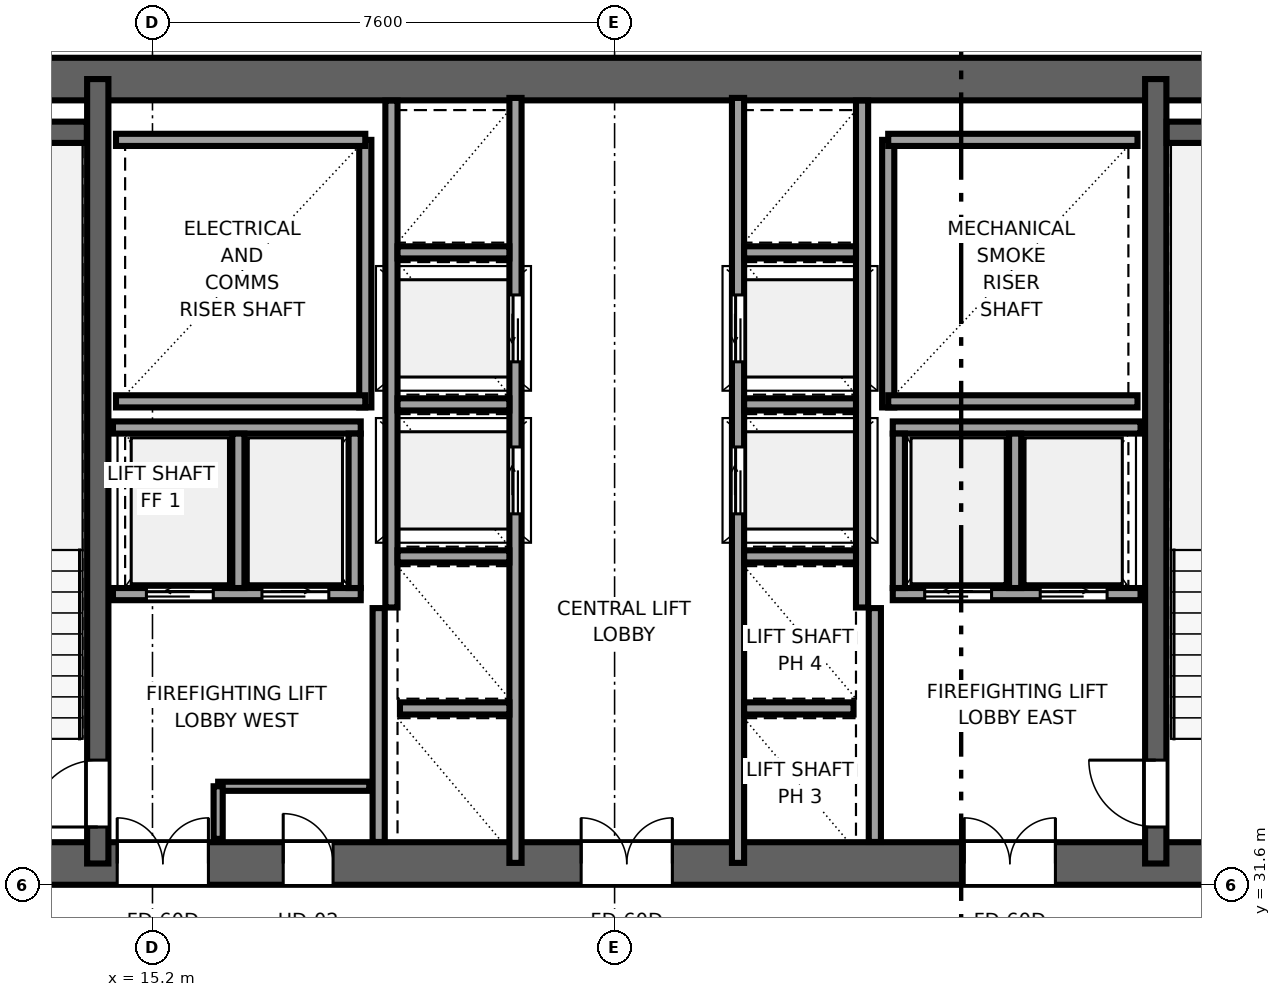
"""IFC4 building model, lengths in metres.
Left out: names, types, materials, properties, quantities, classifications, styles, units other than length and angle.
Written with IfcOpenShell. Run it as: python <this file> out.ifc"""

import sys

from ifc_helpers import new_model, si_unit, direction, frame, frame_2d, origin, place, context, subcontext, project, spatial, rectangle, extrude, source, transform, mapped, element, fill, save


model = new_model("IFC4")
c1 = context("Model", 3, precision=1e-05, world=origin(), true_north=direction((0.0, 1.0)))
c2 = subcontext(c1, "Body", "Model", "MODEL_VIEW")
j1 = project(units=[si_unit("LENGTHUNIT", "METRE"), si_unit("PLANEANGLEUNIT", "RADIAN")], contexts=[c1])
p1 = place(None, origin())
s1 = spatial("IfcSite", under=j1, at=p1, CompositionType="ELEMENT")
p2 = place(p1, origin())
s2 = spatial("IfcBuilding", under=s1, at=p2, CompositionType="ELEMENT")
p3 = place(p2, frame((0.0, 0.0, 164.8)))
s3 = spatial("IfcBuildingStorey", under=s2, at=p3, CompositionType="ELEMENT", Elevation=164.8)
p4 = place(p3, frame((9.8, 31.95, 0.0), z_axis=(0.0, 0.0, 1.0), x_axis=(1.0, 0.0, 0.0)))
e1 = element("IfcWall", 1, at=p4, inside=s3, PredefinedType="SHEAR", context=c2, shape_type="SweptSolid", body=[
    extrude(rectangle(XDim=26.4, YDim=0.7, at=frame_2d((13.2, 0.0))), origin(), (0.0, 0.0, 1.0), 3.55),
])
p5 = place(p4, frame((6.32, 0.0, 0.0), z_axis=(0.0, 0.0, 1.0), x_axis=(-1.0, 0.0, 0.0)))
e2 = element("IfcOpeningElement", 2, at=p5, cuts=e1, PredefinedType="OPENING", context=c2, shape_type="SweptSolid", body=[
    extrude(rectangle(XDim=1.5, YDim=2.04, at=frame_2d((0.75, 1.02))), frame((0.0, 0.36, 0.0), z_axis=(0.0, -1.0, 0.0), x_axis=(1.0, 0.0, 0.0)), (0.0, 0.0, 1.0), 0.72),
])
p6 = place(p4, frame((13.95, 0.0, 0.0), z_axis=(0.0, 0.0, 1.0), x_axis=(-1.0, 0.0, 0.0)))
e3 = element("IfcOpeningElement", 3, at=p6, cuts=e1, PredefinedType="OPENING", context=c2, shape_type="SweptSolid", body=[
    extrude(rectangle(XDim=1.5, YDim=2.04, at=frame_2d((0.75, 1.02))), frame((0.0, 0.36, 0.0), z_axis=(0.0, -1.0, 0.0), x_axis=(1.0, 0.0, 0.0)), (0.0, 0.0, 1.0), 0.72),
])
p7 = place(p4, frame((20.25, 0.0, 0.0), z_axis=(0.0, 0.0, 1.0), x_axis=(-1.0, 0.0, 0.0)))
e4 = element("IfcOpeningElement", 4, at=p7, cuts=e1, PredefinedType="OPENING", context=c2, shape_type="SweptSolid", body=[
    extrude(rectangle(XDim=1.5, YDim=2.04, at=frame_2d((0.75, 1.02))), frame((0.0, 0.36, 0.0), z_axis=(0.0, -1.0, 0.0), x_axis=(1.0, 0.0, 0.0)), (0.0, 0.0, 1.0), 0.72),
])
p8 = place(p4, frame((8.37, 0.0, 0.0), z_axis=(0.0, 0.0, 1.0), x_axis=(-1.0, 0.0, 0.0)))
e5 = element("IfcOpeningElement", 5, at=p8, cuts=e1, PredefinedType="OPENING", context=c2, shape_type="SweptSolid", body=[
    extrude(rectangle(XDim=0.82, YDim=2.01, at=frame_2d((0.41, 1.005))), frame((0.0, 0.36, 0.0), z_axis=(0.0, -1.0, 0.0), x_axis=(1.0, 0.0, 0.0)), (0.0, 0.0, 1.0), 0.72),
])
p9 = place(p3, frame((9.8, 44.85, 0.0), z_axis=(0.0, 0.0, 1.0), x_axis=(1.0, 0.0, 0.0)))
e6 = element("IfcWall", 6, at=p9, inside=s3, PredefinedType="SHEAR", context=c2, shape_type="SweptSolid", body=[
    extrude(rectangle(XDim=26.4, YDim=0.7, at=frame_2d((13.2, 0.0))), origin(), (0.0, 0.0, 1.0), 3.55),
])
p10 = place(p3, frame((14.3, 31.95, 0.0), z_axis=(0.0, 0.0, 1.0), x_axis=(0.0, 1.0, 0.0)))
e7 = element("IfcWall", 7, at=p10, inside=s3, PredefinedType="SHEAR", context=c2, shape_type="SweptSolid", body=[
    extrude(rectangle(XDim=12.9, YDim=0.35, at=frame_2d((6.45, 0.0))), origin(), (0.0, 0.0, 1.0), 3.55),
])
p11 = place(p10, frame((0.6, 0.0, 0.0)))
e8 = element("IfcOpeningElement", 8, at=p11, cuts=e7, PredefinedType="OPENING", context=c2, shape_type="SweptSolid", body=[
    extrude(rectangle(XDim=1.1, YDim=2.12, at=frame_2d((0.55, 1.06))), frame((0.0, 0.185, 0.0), z_axis=(0.0, -1.0, 0.0), x_axis=(1.0, 0.0, 0.0)), (0.0, 0.0, 1.0), 0.37),
])
p12 = place(p3, frame((31.7, 31.95, 0.0), z_axis=(0.0, 0.0, 1.0), x_axis=(0.0, 1.0, 0.0)))
e9 = element("IfcWall", 9, at=p12, inside=s3, PredefinedType="SHEAR", context=c2, shape_type="SweptSolid", body=[
    extrude(rectangle(XDim=12.9, YDim=0.35, at=frame_2d((6.45, 0.0))), origin(), (0.0, 0.0, 1.0), 3.55),
])
p13 = place(p12, frame((1.7, 0.0, 0.0), z_axis=(0.0, 0.0, 1.0), x_axis=(-1.0, 0.0, 0.0)))
e10 = element("IfcOpeningElement", 10, at=p13, cuts=e9, PredefinedType="OPENING", context=c2, shape_type="SweptSolid", body=[
    extrude(rectangle(XDim=1.1, YDim=2.12, at=frame_2d((0.55, 1.06))), frame((0.0, 0.185, 0.0), z_axis=(0.0, -1.0, 0.0), x_axis=(1.0, 0.0, 0.0)), (0.0, 0.0, 1.0), 0.37),
])
for number, where, z_axis, x_axis in (
    (11, (10.52, 43.975, 0.0), (0.0, 0.0, 1.0), (1.0, 0.0, 0.0)),
    (12, (31.88, 43.975, 0.0), (0.0, 0.0, 1.0), (1.0, 0.0, 0.0)),
):
    element("IfcWall", number, at=place(p3, frame(where, z_axis=z_axis, x_axis=x_axis)), inside=s3, PredefinedType="SHEAR", context=c2, shape_type="SweptSolid", body=[
        extrude(rectangle(XDim=3.6, YDim=0.35, at=frame_2d((1.8, 0.0))), origin(), (0.0, 0.0, 1.0), 3.55),
    ])
p14 = place(p3, frame((18.7, 39.45, 0.0), z_axis=(0.0, 0.0, 1.0), x_axis=(0.0, 1.0, 0.0)))
e13 = element("IfcWall", 13, at=p14, inside=s3, PredefinedType="SOLIDWALL", context=c2, shape_type="SweptSolid", body=[
    extrude(rectangle(XDim=4.4, YDim=0.2, at=frame_2d((2.2, 0.0))), origin(), (0.0, 0.0, 1.0), 3.37),
])
for number, where, z_axis, x_axis in (
    (14, (14.6, 39.55, 0.0), (0.0, 0.0, 1.0), (1.0, 0.0, 0.0)),
    (15, (14.6, 43.85, 0.0), (0.0, 0.0, 1.0), (1.0, 0.0, 0.0)),
):
    element("IfcWall", number, at=place(p3, frame(where, z_axis=z_axis, x_axis=x_axis)), inside=s3, PredefinedType="SOLIDWALL", context=c2, shape_type="SweptSolid", body=[
        extrude(rectangle(XDim=4.1, YDim=0.2, at=frame_2d((2.05, 0.0))), origin(), (0.0, 0.0, 1.0), 3.37),
    ])
p15 = place(p3, frame((27.3, 39.45, 0.0), z_axis=(0.0, 0.0, 1.0), x_axis=(0.0, 1.0, 0.0)))
e16 = element("IfcWall", 16, at=p15, inside=s3, PredefinedType="SOLIDWALL", context=c2, shape_type="SweptSolid", body=[
    extrude(rectangle(XDim=4.4, YDim=0.2, at=frame_2d((2.2, 0.0))), origin(), (0.0, 0.0, 1.0), 3.37),
])
for number, where, z_axis, x_axis in (
    (17, (27.3, 39.55, 0.0), (0.0, 0.0, 1.0), (1.0, 0.0, 0.0)),
    (18, (27.3, 43.85, 0.0), (0.0, 0.0, 1.0), (1.0, 0.0, 0.0)),
):
    element("IfcWall", number, at=place(p3, frame(where, z_axis=z_axis, x_axis=x_axis)), inside=s3, PredefinedType="SOLIDWALL", context=c2, shape_type="SweptSolid", body=[
        extrude(rectangle(XDim=4.1, YDim=0.2, at=frame_2d((2.05, 0.0))), origin(), (0.0, 0.0, 1.0), 3.37),
    ])
for number, where, z_axis, x_axis in (
    (19, (18.92, 32.304, 0.0), (0.0, 0.0, 1.0), (0.0, 1.0, 0.0)),
    (20, (27.08, 32.304, 0.0), (0.0, 0.0, 1.0), (0.0, 1.0, 0.0)),
):
    element("IfcWall", number, at=place(p3, frame(where, z_axis=z_axis, x_axis=x_axis)), inside=s3, PredefinedType="SOLIDWALL", context=c2, shape_type="SweptSolid", body=[
        extrude(rectangle(XDim=3.846, YDim=0.2, at=frame_2d((1.923, 0.0))), origin(), (0.0, 0.0, 1.0), 3.37),
    ])
p16 = place(p3, frame((21.17, 31.96, 0.0), z_axis=(0.0, 0.0, 1.0), x_axis=(0.0, 1.0, 0.0)))
e21 = element("IfcWall", 21, at=p16, inside=s3, PredefinedType="SOLIDWALL", context=c2, shape_type="SweptSolid", body=[
    extrude(rectangle(XDim=12.58, YDim=0.2, at=frame_2d((6.29, 0.0))), origin(), (0.0, 0.0, 1.0), 3.37),
])
p17 = place(p16, frame((5.74, 0.0, 0.0)))
e22 = element("IfcOpeningElement", 22, at=p17, cuts=e21, PredefinedType="OPENING", context=c2, shape_type="SweptSolid", body=[
    extrude(rectangle(XDim=1.1, YDim=2.12, at=frame_2d((0.55, 1.06))), frame((0.0, 0.11, 0.0), z_axis=(0.0, -1.0, 0.0), x_axis=(1.0, 0.0, 0.0)), (0.0, 0.0, 1.0), 0.22),
])
p18 = place(p16, frame((8.24, 0.0, 0.0)))
e23 = element("IfcOpeningElement", 23, at=p18, cuts=e21, PredefinedType="OPENING", context=c2, shape_type="SweptSolid", body=[
    extrude(rectangle(XDim=1.1, YDim=2.12, at=frame_2d((0.55, 1.06))), frame((0.0, 0.11, 0.0), z_axis=(0.0, -1.0, 0.0), x_axis=(1.0, 0.0, 0.0)), (0.0, 0.0, 1.0), 0.22),
])
p19 = place(p3, frame((19.13, 36.16, 0.0), z_axis=(0.0, 0.0, 1.0), x_axis=(0.0, 1.0, 0.0)))
e24 = element("IfcWall", 24, at=p19, inside=s3, PredefinedType="SOLIDWALL", context=c2, shape_type="SweptSolid", body=[
    extrude(rectangle(XDim=8.336, YDim=0.2, at=frame_2d((4.168, 0.0))), origin(), (0.0, 0.0, 1.0), 3.37),
])
p20 = place(p3, frame((19.27, 34.5, 0.0), z_axis=(0.0, 0.0, 1.0), x_axis=(1.0, 0.0, 0.0)))
e25 = element("IfcWall", 25, at=p20, inside=s3, PredefinedType="SOLIDWALL", context=c2, shape_type="SweptSolid", body=[
    extrude(rectangle(XDim=1.8, YDim=0.2, at=frame_2d((0.9, 0.0))), origin(), (0.0, 0.0, 1.0), 3.37),
])
for number, where, z_axis, x_axis in (
    (26, (19.23, 37.0, 0.0), (0.0, 0.0, 1.0), (1.0, 0.0, 0.0)),
    (27, (19.23, 39.5, 0.0), (0.0, 0.0, 1.0), (1.0, 0.0, 0.0)),
    (28, (19.23, 42.0, 0.0), (0.0, 0.0, 1.0), (1.0, 0.0, 0.0)),
):
    element("IfcWall", number, at=place(p3, frame(where, z_axis=z_axis, x_axis=x_axis)), inside=s3, PredefinedType="SOLIDWALL", context=c2, shape_type="SweptSolid", body=[
        extrude(rectangle(XDim=1.84, YDim=0.2, at=frame_2d((0.92, 0.0))), origin(), (0.0, 0.0, 1.0), 3.37),
    ])
p21 = place(p3, frame((27.375, 36.38, 0.0), z_axis=(0.0, 0.0, 1.0), x_axis=(1.0, 0.0, 0.0)))
e29 = element("IfcWall", 29, at=p21, inside=s3, PredefinedType="SOLIDWALL", context=c2, shape_type="SweptSolid", body=[
    extrude(rectangle(XDim=4.075, YDim=0.2, at=frame_2d((2.038, 0.0))), origin(), (0.0, 0.0, 1.0), 3.37),
])
p22 = place(p21, frame((0.525, 0.0, 0.0)))
e30 = element("IfcOpeningElement", 30, at=p22, cuts=e29, PredefinedType="OPENING", context=c2, shape_type="SweptSolid", body=[
    extrude(rectangle(XDim=1.1, YDim=2.12, at=frame_2d((0.55, 1.06))), frame((0.0, 0.11, 0.0), z_axis=(0.0, -1.0, 0.0), x_axis=(1.0, 0.0, 0.0)), (0.0, 0.0, 1.0), 0.22),
])
p23 = place(p21, frame((2.425, 0.0, 0.0)))
e31 = element("IfcOpeningElement", 31, at=p23, cuts=e29, PredefinedType="OPENING", context=c2, shape_type="SweptSolid", body=[
    extrude(rectangle(XDim=1.1, YDim=2.12, at=frame_2d((0.55, 1.06))), frame((0.0, 0.11, 0.0), z_axis=(0.0, -1.0, 0.0), x_axis=(1.0, 0.0, 0.0)), (0.0, 0.0, 1.0), 0.22),
])
p24 = place(p3, frame((27.375, 39.12, 0.0), z_axis=(0.0, 0.0, 1.0), x_axis=(1.0, 0.0, 0.0)))
e32 = element("IfcWall", 32, at=p24, inside=s3, PredefinedType="SOLIDWALL", context=c2, shape_type="SweptSolid", body=[
    extrude(rectangle(XDim=4.075, YDim=0.2, at=frame_2d((2.038, 0.0))), origin(), (0.0, 0.0, 1.0), 3.37),
])
for number, where, z_axis, x_axis in (
    (33, (27.475, 36.48, 0.0), (0.0, 0.0, 1.0), (0.0, 1.0, 0.0)),
    (34, (29.387, 36.48, 0.0), (0.0, 0.0, 1.0), (0.0, 1.0, 0.0)),
):
    element("IfcWall", number, at=place(p3, frame(where, z_axis=z_axis, x_axis=x_axis)), inside=s3, PredefinedType="SOLIDWALL", context=c2, shape_type="SweptSolid", body=[
        extrude(rectangle(XDim=2.54, YDim=0.2, at=frame_2d((1.27, 0.0))), origin(), (0.0, 0.0, 1.0), 3.37),
    ])
p25 = place(p3, frame((14.55, 36.38, 0.0), z_axis=(0.0, 0.0, 1.0), x_axis=(1.0, 0.0, 0.0)))
e35 = element("IfcWall", 35, at=p25, inside=s3, PredefinedType="SOLIDWALL", context=c2, shape_type="SweptSolid", body=[
    extrude(rectangle(XDim=4.075, YDim=0.2, at=frame_2d((2.038, 0.0))), origin(), (0.0, 0.0, 1.0), 3.37),
])
p26 = place(p25, frame((0.55, 0.0, 0.0)))
e36 = element("IfcOpeningElement", 36, at=p26, cuts=e35, PredefinedType="OPENING", context=c2, shape_type="SweptSolid", body=[
    extrude(rectangle(XDim=1.1, YDim=2.12, at=frame_2d((0.55, 1.06))), frame((0.0, 0.11, 0.0), z_axis=(0.0, -1.0, 0.0), x_axis=(1.0, 0.0, 0.0)), (0.0, 0.0, 1.0), 0.22),
])
p27 = place(p25, frame((2.45, 0.0, 0.0)))
e37 = element("IfcOpeningElement", 37, at=p27, cuts=e35, PredefinedType="OPENING", context=c2, shape_type="SweptSolid", body=[
    extrude(rectangle(XDim=1.1, YDim=2.12, at=frame_2d((0.55, 1.06))), frame((0.0, 0.11, 0.0), z_axis=(0.0, -1.0, 0.0), x_axis=(1.0, 0.0, 0.0)), (0.0, 0.0, 1.0), 0.22),
])
p28 = place(p3, frame((14.55, 39.12, 0.0), z_axis=(0.0, 0.0, 1.0), x_axis=(1.0, 0.0, 0.0)))
e38 = element("IfcWall", 38, at=p28, inside=s3, PredefinedType="SOLIDWALL", context=c2, shape_type="SweptSolid", body=[
    extrude(rectangle(XDim=4.075, YDim=0.2, at=frame_2d((2.038, 0.0))), origin(), (0.0, 0.0, 1.0), 3.37),
])
for number, where, z_axis, x_axis in (
    (39, (18.525, 36.48, 0.0), (0.0, 0.0, 1.0), (0.0, 1.0, 0.0)),
    (40, (16.613, 36.48, 0.0), (0.0, 0.0, 1.0), (0.0, 1.0, 0.0)),
):
    element("IfcWall", number, at=place(p3, frame(where, z_axis=z_axis, x_axis=x_axis)), inside=s3, PredefinedType="SOLIDWALL", context=c2, shape_type="SweptSolid", body=[
        extrude(rectangle(XDim=2.54, YDim=0.2, at=frame_2d((1.27, 0.0))), origin(), (0.0, 0.0, 1.0), 3.37),
    ])
p29 = place(p3, frame((24.83, 31.96, 0.0), z_axis=(0.0, 0.0, 1.0), x_axis=(0.0, 1.0, 0.0)))
e41 = element("IfcWall", 41, at=p29, inside=s3, PredefinedType="SOLIDWALL", context=c2, shape_type="SweptSolid", body=[
    extrude(rectangle(XDim=12.58, YDim=0.2, at=frame_2d((6.29, 0.0))), origin(), (0.0, 0.0, 1.0), 3.37),
])
p30 = place(p29, frame((5.74, 0.0, 0.0)))
e42 = element("IfcOpeningElement", 42, at=p30, cuts=e41, PredefinedType="OPENING", context=c2, shape_type="SweptSolid", body=[
    extrude(rectangle(XDim=1.1, YDim=2.12, at=frame_2d((0.55, 1.06))), frame((0.0, 0.11, 0.0), z_axis=(0.0, -1.0, 0.0), x_axis=(1.0, 0.0, 0.0)), (0.0, 0.0, 1.0), 0.22),
])
p31 = place(p29, frame((8.24, 0.0, 0.0)))
e43 = element("IfcOpeningElement", 43, at=p31, cuts=e41, PredefinedType="OPENING", context=c2, shape_type="SweptSolid", body=[
    extrude(rectangle(XDim=1.1, YDim=2.12, at=frame_2d((0.55, 1.06))), frame((0.0, 0.11, 0.0), z_axis=(0.0, -1.0, 0.0), x_axis=(1.0, 0.0, 0.0)), (0.0, 0.0, 1.0), 0.22),
])
p32 = place(p3, frame((26.87, 36.16, 0.0), z_axis=(0.0, 0.0, 1.0), x_axis=(0.0, 1.0, 0.0)))
e44 = element("IfcWall", 44, at=p32, inside=s3, PredefinedType="SOLIDWALL", context=c2, shape_type="SweptSolid", body=[
    extrude(rectangle(XDim=8.336, YDim=0.2, at=frame_2d((4.168, 0.0))), origin(), (0.0, 0.0, 1.0), 3.37),
])
p33 = place(p3, frame((24.93, 34.5, 0.0), z_axis=(0.0, 0.0, 1.0), x_axis=(1.0, 0.0, 0.0)))
e45 = element("IfcWall", 45, at=p33, inside=s3, PredefinedType="SOLIDWALL", context=c2, shape_type="SweptSolid", body=[
    extrude(rectangle(XDim=1.8, YDim=0.2, at=frame_2d((0.9, 0.0))), origin(), (0.0, 0.0, 1.0), 3.37),
])
for number, where, z_axis, x_axis in (
    (46, (24.93, 37.0, 0.0), (0.0, 0.0, 1.0), (1.0, 0.0, 0.0)),
    (47, (24.93, 39.5, 0.0), (0.0, 0.0, 1.0), (1.0, 0.0, 0.0)),
    (48, (24.93, 42.0, 0.0), (0.0, 0.0, 1.0), (1.0, 0.0, 0.0)),
):
    element("IfcWall", number, at=place(p3, frame(where, z_axis=z_axis, x_axis=x_axis)), inside=s3, PredefinedType="SOLIDWALL", context=c2, shape_type="SweptSolid", body=[
        extrude(rectangle(XDim=1.84, YDim=0.2, at=frame_2d((0.92, 0.0))), origin(), (0.0, 0.0, 1.0), 3.37),
    ])
p34 = place(p3, frame((16.28, 33.22, 0.0), z_axis=(0.0, 0.0, 1.0), x_axis=(1.0, 0.0, 0.0)))
e49 = element("IfcWall", 49, at=p34, inside=s3, PredefinedType="PARTITIONING", context=c2, shape_type="SweptSolid", body=[
    extrude(rectangle(XDim=2.485, YDim=0.15, at=frame_2d((1.242, 0.0))), origin(), (0.0, 0.0, 1.0), 3.37),
])
p35 = place(p3, frame((16.28, 32.355, 0.0), z_axis=(0.0, 0.0, 1.0), x_axis=(0.0, 1.0, 0.0)))
e50 = element("IfcWall", 50, at=p35, inside=s3, PredefinedType="PARTITIONING", context=c2, shape_type="SweptSolid", body=[
    extrude(rectangle(XDim=0.865, YDim=0.15, at=frame_2d((0.433, 0.0))), origin(), (0.0, 0.0, 1.0), 3.37),
])
m1 = source(origin(), c2, "Body", "SweptSolid", [
    extrude(rectangle(XDim=1.1, YDim=2.12, at=frame_2d((0.55, 1.06))), frame((0.0, 0.025, 0.0), z_axis=(0.0, -1.0, 0.0), x_axis=(1.0, 0.0, 0.0)), (0.0, 0.0, 1.0), 0.05),
])
p36 = place(p11, origin())
e51 = element("IfcDoor", 51, at=p36, inside=s3, OperationType="SINGLE_SWING_LEFT", PredefinedType="DOOR", context=c2, shape_type="MappedRepresentation", body=[
    mapped(m1, transform((0.0, 0.0, 0.0), x_axis=(1.0, 0.0, 0.0), y_axis=(0.0, 1.0, 0.0), z_axis=(0.0, 0.0, 1.0), scale=1.0)),
])
fill(e8, e51)
p37 = place(p13, origin())
e52 = element("IfcDoor", 52, at=p37, inside=s3, OperationType="SINGLE_SWING_RIGHT", PredefinedType="DOOR", context=c2, shape_type="MappedRepresentation", body=[
    mapped(m1, transform((0.0, 0.0, 0.0), x_axis=(1.0, 0.0, 0.0), y_axis=(0.0, 1.0, 0.0), z_axis=(0.0, 0.0, 1.0), scale=1.0)),
])
fill(e10, e52)
m2 = source(origin(), c2, "Body", "SweptSolid", [
    extrude(rectangle(XDim=1.5, YDim=2.04, at=frame_2d((0.75, 1.02))), frame((0.0, 0.025, 0.0), z_axis=(0.0, -1.0, 0.0), x_axis=(1.0, 0.0, 0.0)), (0.0, 0.0, 1.0), 0.05),
])
p38 = place(p5, origin())
e53 = element("IfcDoor", 53, at=p38, inside=s3, OperationType="DOUBLE_DOOR_SINGLE_SWING", PredefinedType="DOOR", context=c2, shape_type="MappedRepresentation", body=[
    mapped(m2, transform((0.0, 0.0, 0.0), x_axis=(1.0, 0.0, 0.0), y_axis=(0.0, 1.0, 0.0), z_axis=(0.0, 0.0, 1.0), scale=1.0)),
])
fill(e2, e53)
p39 = place(p6, origin())
e54 = element("IfcDoor", 54, at=p39, inside=s3, OperationType="DOUBLE_DOOR_SINGLE_SWING", PredefinedType="DOOR", context=c2, shape_type="MappedRepresentation", body=[
    mapped(m2, transform((0.0, 0.0, 0.0), x_axis=(1.0, 0.0, 0.0), y_axis=(0.0, 1.0, 0.0), z_axis=(0.0, 0.0, 1.0), scale=1.0)),
])
fill(e3, e54)
p40 = place(p7, origin())
e55 = element("IfcDoor", 55, at=p40, inside=s3, OperationType="DOUBLE_DOOR_SINGLE_SWING", PredefinedType="DOOR", context=c2, shape_type="MappedRepresentation", body=[
    mapped(m2, transform((0.0, 0.0, 0.0), x_axis=(1.0, 0.0, 0.0), y_axis=(0.0, 1.0, 0.0), z_axis=(0.0, 0.0, 1.0), scale=1.0)),
])
fill(e4, e55)
m3 = source(origin(), c2, "Body", "SweptSolid", [
    extrude(rectangle(XDim=0.82, YDim=2.01, at=frame_2d((0.41, 1.005))), frame((0.0, 0.025, 0.0), z_axis=(0.0, -1.0, 0.0), x_axis=(1.0, 0.0, 0.0)), (0.0, 0.0, 1.0), 0.05),
])
p41 = place(p8, origin())
e56 = element("IfcDoor", 56, at=p41, inside=s3, OperationType="SINGLE_SWING_LEFT", PredefinedType="DOOR", context=c2, shape_type="MappedRepresentation", body=[
    mapped(m3, transform((0.0, 0.0, 0.0), x_axis=(1.0, 0.0, 0.0), y_axis=(0.0, 1.0, 0.0), z_axis=(0.0, 0.0, 1.0), scale=1.0)),
])
fill(e5, e56)
m4 = source(origin(), c2, "Body", "SweptSolid", [
    extrude(rectangle(XDim=1.1, YDim=2.12, at=frame_2d((0.55, 1.06))), frame((0.0, 0.025, 0.0), z_axis=(0.0, -1.0, 0.0), x_axis=(1.0, 0.0, 0.0)), (0.0, 0.0, 1.0), 0.05),
])
p42 = place(p17, origin())
e57 = element("IfcDoor", 57, at=p42, inside=s3, OperationType="SLIDING_TO_RIGHT", PredefinedType="DOOR", context=c2, shape_type="MappedRepresentation", body=[
    mapped(m4, transform((0.0, 0.0, 0.0), x_axis=(1.0, 0.0, 0.0), y_axis=(0.0, 1.0, 0.0), z_axis=(0.0, 0.0, 1.0), scale=1.0)),
])
fill(e22, e57)
p43 = place(p18, origin())
e58 = element("IfcDoor", 58, at=p43, inside=s3, OperationType="SLIDING_TO_LEFT", PredefinedType="DOOR", context=c2, shape_type="MappedRepresentation", body=[
    mapped(m4, transform((0.0, 0.0, 0.0), x_axis=(1.0, 0.0, 0.0), y_axis=(0.0, 1.0, 0.0), z_axis=(0.0, 0.0, 1.0), scale=1.0)),
])
fill(e23, e58)
p44 = place(p22, origin())
e59 = element("IfcDoor", 59, at=p44, inside=s3, OperationType="SLIDING_TO_LEFT", PredefinedType="DOOR", context=c2, shape_type="MappedRepresentation", body=[
    mapped(m4, transform((0.0, 0.0, 0.0), x_axis=(1.0, 0.0, 0.0), y_axis=(0.0, 1.0, 0.0), z_axis=(0.0, 0.0, 1.0), scale=1.0)),
])
fill(e30, e59)
p45 = place(p23, origin())
e60 = element("IfcDoor", 60, at=p45, inside=s3, OperationType="SLIDING_TO_RIGHT", PredefinedType="DOOR", context=c2, shape_type="MappedRepresentation", body=[
    mapped(m4, transform((0.0, 0.0, 0.0), x_axis=(1.0, 0.0, 0.0), y_axis=(0.0, 1.0, 0.0), z_axis=(0.0, 0.0, 1.0), scale=1.0)),
])
fill(e31, e60)
p46 = place(p26, origin())
e61 = element("IfcDoor", 61, at=p46, inside=s3, OperationType="SLIDING_TO_LEFT", PredefinedType="DOOR", context=c2, shape_type="MappedRepresentation", body=[
    mapped(m4, transform((0.0, 0.0, 0.0), x_axis=(1.0, 0.0, 0.0), y_axis=(0.0, 1.0, 0.0), z_axis=(0.0, 0.0, 1.0), scale=1.0)),
])
fill(e36, e61)
p47 = place(p27, origin())
e62 = element("IfcDoor", 62, at=p47, inside=s3, OperationType="SLIDING_TO_RIGHT", PredefinedType="DOOR", context=c2, shape_type="MappedRepresentation", body=[
    mapped(m4, transform((0.0, 0.0, 0.0), x_axis=(1.0, 0.0, 0.0), y_axis=(0.0, 1.0, 0.0), z_axis=(0.0, 0.0, 1.0), scale=1.0)),
])
fill(e37, e62)
p48 = place(p30, origin())
e63 = element("IfcDoor", 63, at=p48, inside=s3, OperationType="SLIDING_TO_RIGHT", PredefinedType="DOOR", context=c2, shape_type="MappedRepresentation", body=[
    mapped(m4, transform((0.0, 0.0, 0.0), x_axis=(1.0, 0.0, 0.0), y_axis=(0.0, 1.0, 0.0), z_axis=(0.0, 0.0, 1.0), scale=1.0)),
])
fill(e42, e63)
p49 = place(p31, origin())
e64 = element("IfcDoor", 64, at=p49, inside=s3, OperationType="SLIDING_TO_LEFT", PredefinedType="DOOR", context=c2, shape_type="MappedRepresentation", body=[
    mapped(m4, transform((0.0, 0.0, 0.0), x_axis=(1.0, 0.0, 0.0), y_axis=(0.0, 1.0, 0.0), z_axis=(0.0, 0.0, 1.0), scale=1.0)),
])
fill(e43, e64)
save(model, sys.argv[1])
